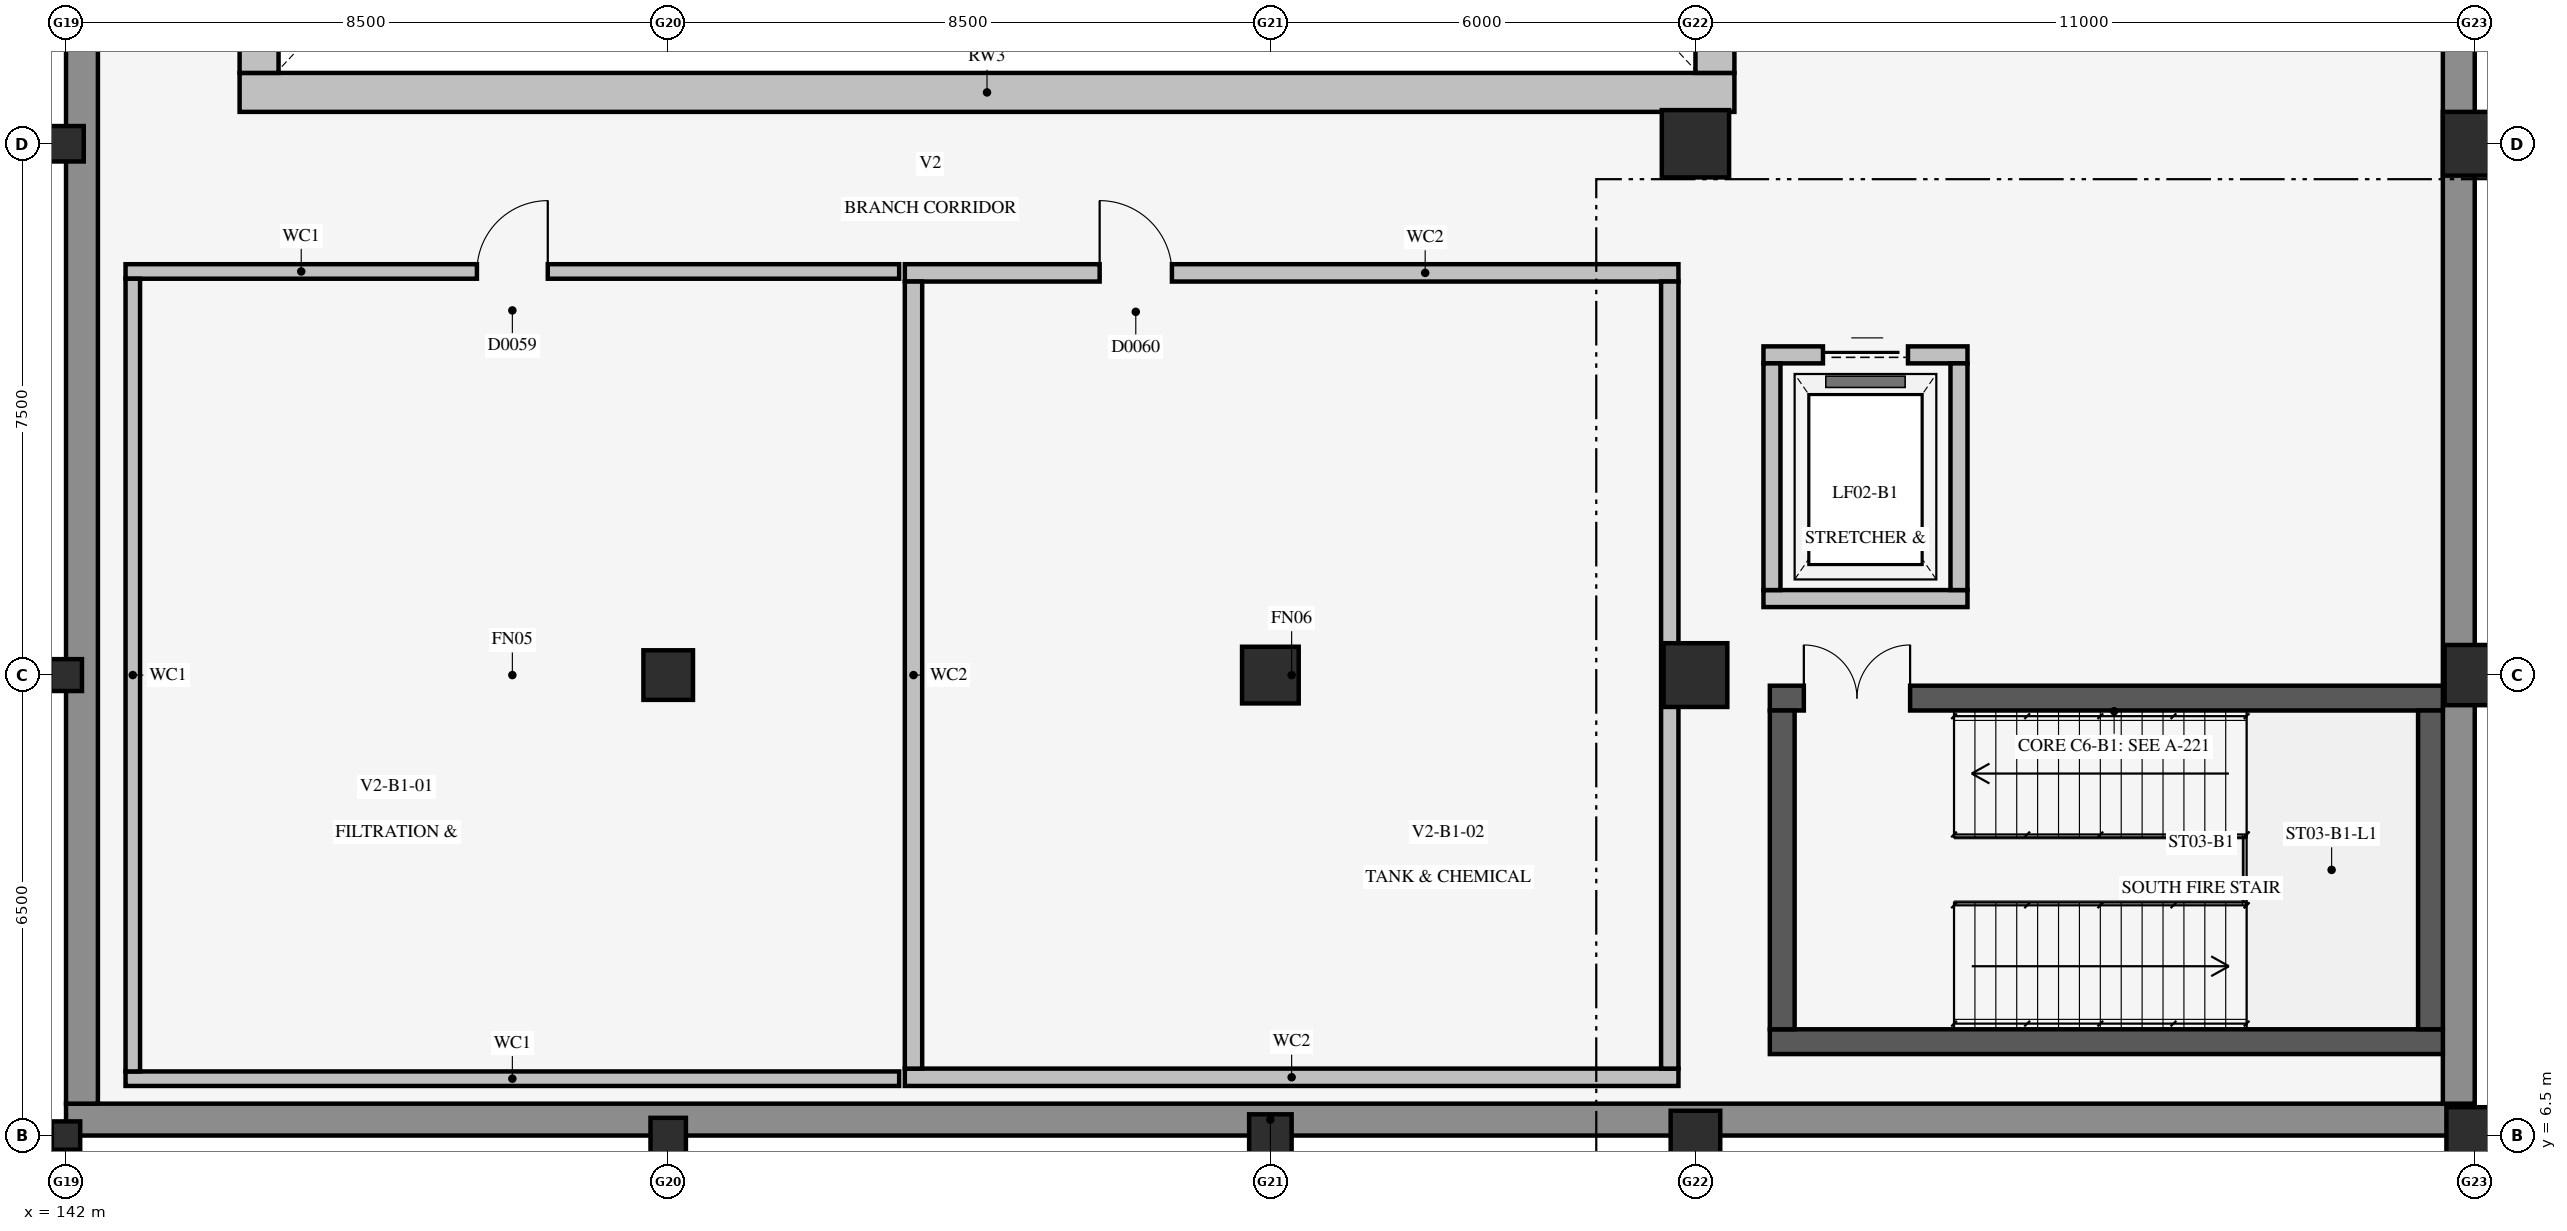
"""IFC4 building model, lengths in metres.
Left out: names, types, materials, properties, quantities, classifications, styles, units other than length and angle.
Written with IfcOpenShell. Run it as: python <this file> out.ifc"""

import sys

from ifc_helpers import new_model, si_unit, direction, frame, frame_2d, origin, origin_2d, place, context, subcontext, project, spatial, rectangle, extrude, element, fill, save


model = new_model("IFC4")
c1 = context("Model", 3, precision=1e-05, world=origin(), true_north=direction((0.0, 1.0)))
c2 = subcontext(c1, "Body", "Model", "MODEL_VIEW")
j1 = project(units=[si_unit("LENGTHUNIT", "METRE"), si_unit("PLANEANGLEUNIT", "RADIAN")], contexts=[c1])
p1 = place(None, origin())
s1 = spatial("IfcSite", under=j1, at=p1, CompositionType="ELEMENT")
p2 = place(p1, origin())
s2 = spatial("IfcBuilding", under=s1, at=p2, CompositionType="ELEMENT")
p3 = place(p2, frame((0.0, 0.0, -5.2)))
s3 = spatial("IfcBuildingStorey", under=s2, at=p3, CompositionType="ELEMENT", Elevation=-5.2)
p4 = place(p3, frame((144.45, 21.225, 0.2), z_axis=(0.0, 0.0, 1.0), x_axis=(1.0, 0.0, 0.0)))
e1 = element("IfcWall", 1, at=p4, inside=s3, PredefinedType="USERDEFINED", context=c2, shape_type="SweptSolid", body=[
    extrude(rectangle(XDim=21.1, YDim=0.55, at=frame_2d((10.55, 0.0))), origin(), (0.0, 0.0, 1.0), 4.72),
])
for number, where, z_axis, x_axis in (
    (2, (144.725, 21.5, 0.2), (0.0, 0.0, 1.0), (0.0, 1.0, 0.0)),
    (3, (165.275, 21.5, 0.2), (0.0, 0.0, 1.0), (0.0, 1.0, 0.0)),
):
    element("IfcWall", number, at=place(p3, frame(where, z_axis=z_axis, x_axis=x_axis)), inside=s3, PredefinedType="USERDEFINED", context=c2, shape_type="SweptSolid", body=[
        extrude(rectangle(XDim=21.5, YDim=0.55, at=frame_2d((10.75, 0.0))), origin(), (0.0, 0.0, 1.0), 4.72),
    ])
p5 = place(p3, frame((142.0, 6.725, 0.0), z_axis=(0.0, 0.0, 1.0), x_axis=(1.0, 0.0, 0.0)))
e4 = element("IfcWall", 4, at=p5, inside=s3, PredefinedType="USERDEFINED", context=c2, shape_type="SweptSolid", body=[
    extrude(rectangle(XDim=34.0, YDim=0.45, at=frame_2d((17.0, 0.0))), origin(), (0.0, 0.0, 1.0), 4.92),
])
for number, where, z_axis, x_axis in (
    (5, (142.225, 6.95, 0.0), (0.0, 0.0, 1.0), (0.0, 1.0, 0.0)),
    (6, (175.775, 6.95, 0.0), (0.0, 0.0, 1.0), (0.0, 1.0, 0.0)),
):
    element("IfcWall", number, at=place(p3, frame(where, z_axis=z_axis, x_axis=x_axis)), inside=s3, PredefinedType="USERDEFINED", context=c2, shape_type="SweptSolid", body=[
        extrude(rectangle(XDim=51.6, YDim=0.45, at=frame_2d((25.8, 0.0))), origin(), (0.0, 0.0, 1.0), 4.92),
    ])
p6 = place(p3, frame((166.05, 7.825, 0.0), z_axis=(0.0, 0.0, 1.0), x_axis=(1.0, 0.0, 0.0)))
e7 = element("IfcWall", 7, at=p6, inside=s3, PredefinedType="SHEAR", context=c2, shape_type="SweptSolid", body=[
    extrude(rectangle(XDim=9.5, YDim=0.35, at=frame_2d((4.75, 0.0))), origin(), (0.0, 0.0, 1.0), 4.92),
])
p7 = place(p3, frame((166.05, 12.675, 0.0), z_axis=(0.0, 0.0, 1.0), x_axis=(1.0, 0.0, 0.0)))
e8 = element("IfcWall", 8, at=p7, inside=s3, PredefinedType="SHEAR", context=c2, shape_type="SweptSolid", body=[
    extrude(rectangle(XDim=9.5, YDim=0.35, at=frame_2d((4.75, 0.0))), origin(), (0.0, 0.0, 1.0), 4.92),
])
p8 = place(p7, frame((0.48, 0.0, 0.0)))
e9 = element("IfcOpeningElement", 9, at=p8, cuts=e8, PredefinedType="OPENING", context=c2, shape_type="SweptSolid", body=[
    extrude(rectangle(XDim=1.5, YDim=2.3, at=frame_2d((0.75, 1.15))), frame((0.0, 0.187, 0.0), z_axis=(0.0, -1.0, 0.0), x_axis=(1.0, 0.0, 0.0)), (0.0, 0.0, 1.0), 0.374),
])
for number, where, z_axis, x_axis in (
    (10, (166.225, 8.0, 0.0), (0.0, 0.0, 1.0), (0.0, 1.0, 0.0)),
    (11, (175.375, 8.0, 0.0), (0.0, 0.0, 1.0), (0.0, 1.0, 0.0)),
):
    element("IfcWall", number, at=place(p3, frame(where, z_axis=z_axis, x_axis=x_axis)), inside=s3, PredefinedType="SHEAR", context=c2, shape_type="SweptSolid", body=[
        extrude(rectangle(XDim=4.5, YDim=0.35, at=frame_2d((2.25, 0.0))), origin(), (0.0, 0.0, 1.0), 4.92),
    ])
p9 = place(p3, frame((165.96, 14.08, 0.0), z_axis=(0.0, 0.0, 1.0), x_axis=(1.0, 0.0, 0.0)))
e12 = element("IfcWall", 12, at=p9, inside=s3, PredefinedType="SOLIDWALL", context=c2, shape_type="SweptSolid", body=[
    extrude(rectangle(XDim=2.88, YDim=0.24, at=frame_2d((1.44, 0.0))), origin(), (0.0, 0.0, 1.0), 5.2),
])
p10 = place(p3, frame((165.96, 17.52, 0.0), z_axis=(0.0, 0.0, 1.0), x_axis=(1.0, 0.0, 0.0)))
e13 = element("IfcWall", 13, at=p10, inside=s3, PredefinedType="SOLIDWALL", context=c2, shape_type="SweptSolid", body=[
    extrude(rectangle(XDim=2.88, YDim=0.24, at=frame_2d((1.44, 0.0))), origin(), (0.0, 0.0, 1.0), 5.2),
])
p11 = place(p10, frame((0.84, 0.0, 0.0)))
e14 = element("IfcOpeningElement", 14, at=p11, cuts=e13, PredefinedType="OPENING", context=c2, shape_type="SweptSolid", body=[
    extrude(rectangle(XDim=1.2, YDim=2.2, at=frame_2d((0.6, 1.1))), frame((0.0, 0.132, 0.0), z_axis=(0.0, -1.0, 0.0), x_axis=(1.0, 0.0, 0.0)), (0.0, 0.0, 1.0), 0.264),
])
for number, where, z_axis, x_axis in (
    (15, (166.08, 14.2, 0.0), (0.0, 0.0, 1.0), (0.0, 1.0, 0.0)),
    (16, (168.72, 14.2, 0.0), (0.0, 0.0, 1.0), (0.0, 1.0, 0.0)),
):
    element("IfcWall", number, at=place(p3, frame(where, z_axis=z_axis, x_axis=x_axis)), inside=s3, PredefinedType="SOLIDWALL", context=c2, shape_type="SweptSolid", body=[
        extrude(rectangle(XDim=3.2, YDim=0.24, at=frame_2d((1.6, 0.0))), origin(), (0.0, 0.0, 1.0), 5.2),
    ])
p12 = place(p3, frame((142.0, 6.5, 0.0), z_axis=(0.0, 0.0, 1.0), x_axis=(1.0, 0.0, 0.0)))
e17 = element("IfcColumn", 17, at=p12, inside=s3, PredefinedType="COLUMN", context=c2, shape_type="SweptSolid", body=[
    extrude(rectangle(XDim=0.4, YDim=0.4, at=origin_2d()), origin(), (0.0, 0.0, 1.0), 5.2),
])
p13 = place(p3, frame((142.0, 13.0, 0.0), z_axis=(0.0, 0.0, 1.0), x_axis=(1.0, 0.0, 0.0)))
e18 = element("IfcColumn", 18, at=p13, inside=s3, PredefinedType="COLUMN", context=c2, shape_type="SweptSolid", body=[
    extrude(rectangle(XDim=0.45, YDim=0.45, at=origin_2d()), origin(), (0.0, 0.0, 1.0), 5.2),
])
for number, where, z_axis, x_axis in (
    (19, (142.0, 20.5, 0.0), (0.0, 0.0, 1.0), (1.0, 0.0, 0.0)),
    (20, (150.5, 6.5, 0.0), (0.0, 0.0, 1.0), (1.0, 0.0, 0.0)),
):
    element("IfcColumn", number, at=place(p3, frame(where, z_axis=z_axis, x_axis=x_axis)), inside=s3, PredefinedType="COLUMN", context=c2, shape_type="SweptSolid", body=[
        extrude(rectangle(XDim=0.5, YDim=0.5, at=origin_2d()), origin(), (0.0, 0.0, 1.0), 5.2),
    ])
p14 = place(p3, frame((150.5, 13.0, 0.0), z_axis=(0.0, 0.0, 1.0), x_axis=(1.0, 0.0, 0.0)))
e21 = element("IfcColumn", 21, at=p14, inside=s3, PredefinedType="COLUMN", context=c2, shape_type="SweptSolid", body=[
    extrude(rectangle(XDim=0.7, YDim=0.7, at=origin_2d()), origin(), (0.0, 0.0, 1.0), 5.2),
])
p15 = place(p3, frame((159.0, 6.5, 0.0), z_axis=(0.0, 0.0, 1.0), x_axis=(1.0, 0.0, 0.0)))
e22 = element("IfcColumn", 22, at=p15, inside=s3, PredefinedType="COLUMN", context=c2, shape_type="SweptSolid", body=[
    extrude(rectangle(XDim=0.6, YDim=0.6, at=origin_2d()), origin(), (0.0, 0.0, 1.0), 5.2),
])
p16 = place(p3, frame((159.0, 13.0, 0.0), z_axis=(0.0, 0.0, 1.0), x_axis=(1.0, 0.0, 0.0)))
e23 = element("IfcColumn", 23, at=p16, inside=s3, PredefinedType="COLUMN", context=c2, shape_type="SweptSolid", body=[
    extrude(rectangle(XDim=0.8, YDim=0.8, at=origin_2d()), origin(), (0.0, 0.0, 1.0), 5.2),
])
p17 = place(p3, frame((165.0, 6.5, 0.0), z_axis=(0.0, 0.0, 1.0), x_axis=(1.0, 0.0, 0.0)))
e24 = element("IfcColumn", 24, at=p17, inside=s3, PredefinedType="COLUMN", context=c2, shape_type="SweptSolid", body=[
    extrude(rectangle(XDim=0.7, YDim=0.7, at=origin_2d()), origin(), (0.0, 0.0, 1.0), 5.2),
])
p18 = place(p3, frame((165.0, 13.0, 0.0), z_axis=(0.0, 0.0, 1.0), x_axis=(1.0, 0.0, 0.0)))
e25 = element("IfcColumn", 25, at=p18, inside=s3, PredefinedType="COLUMN", context=c2, shape_type="SweptSolid", body=[
    extrude(rectangle(XDim=0.9, YDim=0.9, at=origin_2d()), origin(), (0.0, 0.0, 1.0), 5.2),
])
p19 = place(p3, frame((165.0, 20.5, 0.0), z_axis=(0.0, 0.0, 1.0), x_axis=(1.0, 0.0, 0.0)))
e26 = element("IfcColumn", 26, at=p19, inside=s3, PredefinedType="COLUMN", context=c2, shape_type="SweptSolid", body=[
    extrude(rectangle(XDim=0.95, YDim=0.95, at=origin_2d()), origin(), (0.0, 0.0, 1.0), 5.2),
])
p20 = place(p3, frame((176.0, 6.5, 0.0), z_axis=(0.0, 0.0, 1.0), x_axis=(1.0, 0.0, 0.0)))
e27 = element("IfcColumn", 27, at=p20, inside=s3, PredefinedType="COLUMN", context=c2, shape_type="SweptSolid", body=[
    extrude(rectangle(XDim=0.8, YDim=0.8, at=origin_2d()), origin(), (0.0, 0.0, 1.0), 5.2),
])
p21 = place(p3, frame((176.0, 13.0, 0.0), z_axis=(0.0, 0.0, 1.0), x_axis=(1.0, 0.0, 0.0)))
e28 = element("IfcColumn", 28, at=p21, inside=s3, PredefinedType="COLUMN", context=c2, shape_type="SweptSolid", body=[
    extrude(rectangle(XDim=0.85, YDim=0.85, at=origin_2d()), origin(), (0.0, 0.0, 1.0), 5.2),
])
p22 = place(p3, frame((176.0, 20.5, 0.0), z_axis=(0.0, 0.0, 1.0), x_axis=(1.0, 0.0, 0.0)))
e29 = element("IfcColumn", 29, at=p22, inside=s3, PredefinedType="COLUMN", context=c2, shape_type="SweptSolid", body=[
    extrude(rectangle(XDim=0.9, YDim=0.9, at=origin_2d()), origin(), (0.0, 0.0, 1.0), 5.2),
])
p23 = place(p3, frame((142.84, 7.302, 0.0), z_axis=(0.0, 0.0, 1.0), x_axis=(1.0, 0.0, 0.0)))
e30 = element("IfcWall", 30, at=p23, inside=s3, PredefinedType="SOLIDWALL", context=c2, shape_type="SweptSolid", body=[
    extrude(rectangle(XDim=10.92, YDim=0.205, at=frame_2d((5.46, 0.0))), origin(), (0.0, 0.0, 1.0), 4.905),
])
p24 = place(p3, frame((142.84, 18.698, 0.0), z_axis=(0.0, 0.0, 1.0), x_axis=(1.0, 0.0, 0.0)))
e31 = element("IfcWall", 31, at=p24, inside=s3, PredefinedType="SOLIDWALL", context=c2, shape_type="SweptSolid", body=[
    extrude(rectangle(XDim=10.92, YDim=0.205, at=frame_2d((5.46, 0.0))), origin(), (0.0, 0.0, 1.0), 4.905),
])
p25 = place(p24, frame((4.96, 0.0, 0.0)))
e32 = element("IfcOpeningElement", 32, at=p25, cuts=e31, PredefinedType="OPENING", context=c2, shape_type="SweptSolid", body=[
    extrude(rectangle(XDim=1.0, YDim=2.2, at=frame_2d((0.5, 1.1))), frame((0.0, 0.115, 0.0), z_axis=(0.0, -1.0, 0.0), x_axis=(1.0, 0.0, 0.0)), (0.0, 0.0, 1.0), 0.229),
])
p26 = place(p3, frame((142.942, 7.405, 0.0), z_axis=(0.0, 0.0, 1.0), x_axis=(0.0, 1.0, 0.0)))
e33 = element("IfcWall", 33, at=p26, inside=s3, PredefinedType="SOLIDWALL", context=c2, shape_type="SweptSolid", body=[
    extrude(rectangle(XDim=11.19, YDim=0.205, at=frame_2d((5.595, 0.0))), origin(), (0.0, 0.0, 1.0), 4.905),
])
p27 = place(p3, frame((153.84, 7.323, 0.0), z_axis=(0.0, 0.0, 1.0), x_axis=(1.0, 0.0, 0.0)))
e34 = element("IfcWall", 34, at=p27, inside=s3, PredefinedType="SOLIDWALL", context=c2, shape_type="SweptSolid", body=[
    extrude(rectangle(XDim=10.92, YDim=0.245, at=frame_2d((5.46, 0.0))), origin(), (0.0, 0.0, 1.0), 4.905),
])
p28 = place(p3, frame((153.84, 18.677, 0.0), z_axis=(0.0, 0.0, 1.0), x_axis=(1.0, 0.0, 0.0)))
e35 = element("IfcWall", 35, at=p28, inside=s3, PredefinedType="SOLIDWALL", context=c2, shape_type="SweptSolid", body=[
    extrude(rectangle(XDim=10.92, YDim=0.245, at=frame_2d((5.46, 0.0))), origin(), (0.0, 0.0, 1.0), 4.905),
])
p29 = place(p28, frame((2.75, 0.0, 0.0)))
e36 = element("IfcOpeningElement", 36, at=p29, cuts=e35, PredefinedType="OPENING", context=c2, shape_type="SweptSolid", body=[
    extrude(rectangle(XDim=1.02, YDim=2.2, at=frame_2d((0.51, 1.1))), frame((0.0, 0.135, 0.0), z_axis=(0.0, -1.0, 0.0), x_axis=(1.0, 0.0, 0.0)), (0.0, 0.0, 1.0), 0.269),
])
p30 = place(p3, frame((164.637, 7.445, 0.0), z_axis=(0.0, 0.0, 1.0), x_axis=(0.0, 1.0, 0.0)))
e37 = element("IfcWall", 37, at=p30, inside=s3, PredefinedType="SOLIDWALL", context=c2, shape_type="SweptSolid", body=[
    extrude(rectangle(XDim=11.11, YDim=0.245, at=frame_2d((5.555, 0.0))), origin(), (0.0, 0.0, 1.0), 3.64),
])
p31 = place(p3, frame((153.962, 7.445, 0.0), z_axis=(0.0, 0.0, 1.0), x_axis=(0.0, 1.0, 0.0)))
e38 = element("IfcWall", 38, at=p31, inside=s3, PredefinedType="SOLIDWALL", context=c2, shape_type="SweptSolid", body=[
    extrude(rectangle(XDim=11.11, YDim=0.245, at=frame_2d((5.555, 0.0))), origin(), (0.0, 0.0, 1.0), 4.905),
])
p32 = place(p8, frame((1.5, 0.0, 0.0), z_axis=(0.0, 0.0, 1.0), x_axis=(-1.0, 0.0, 0.0)))
e39 = element("IfcDoor", 39, at=p32, inside=s3, OperationType="DOUBLE_DOOR_SINGLE_SWING", PredefinedType="DOOR", context=c2, shape_type="SweptSolid", body=[
    extrude(rectangle(XDim=1.5, YDim=2.3, at=frame_2d((0.75, 1.15))), frame((0.0, 0.025, 0.0), z_axis=(0.0, -1.0, 0.0), x_axis=(1.0, 0.0, 0.0)), (0.0, 0.0, 1.0), 0.05),
])
fill(e9, e39)
p33 = place(p25, frame((1.0, 0.0, 0.0), z_axis=(0.0, 0.0, 1.0), x_axis=(-1.0, 0.0, 0.0)))
e40 = element("IfcDoor", 40, at=p33, inside=s3, OperationType="SINGLE_SWING_RIGHT", PredefinedType="DOOR", context=c2, shape_type="SweptSolid", body=[
    extrude(rectangle(XDim=1.0, YDim=2.2, at=frame_2d((0.5, 1.1))), frame((0.0, 0.025, 0.0), z_axis=(0.0, -1.0, 0.0), x_axis=(1.0, 0.0, 0.0)), (0.0, 0.0, 1.0), 0.05),
])
fill(e32, e40)
p34 = place(p29, frame((1.02, 0.0, 0.0), z_axis=(0.0, 0.0, 1.0), x_axis=(-1.0, 0.0, 0.0)))
e41 = element("IfcDoor", 41, at=p34, inside=s3, OperationType="SINGLE_SWING_LEFT", PredefinedType="DOOR", context=c2, shape_type="SweptSolid", body=[
    extrude(rectangle(XDim=1.02, YDim=2.2, at=frame_2d((0.51, 1.1))), frame((0.0, 0.025, 0.0), z_axis=(0.0, -1.0, 0.0), x_axis=(1.0, 0.0, 0.0)), (0.0, 0.0, 1.0), 0.05),
])
fill(e36, e41)
p35 = place(p11, origin())
e42 = element("IfcDoor", 42, at=p35, inside=s3, OperationType="SLIDING_TO_LEFT", PredefinedType="USERDEFINED", context=c2, shape_type="SweptSolid", body=[
    extrude(rectangle(XDim=1.2, YDim=2.2, at=frame_2d((0.6, 1.1))), frame((0.0, 0.025, 0.0), z_axis=(0.0, -1.0, 0.0), x_axis=(1.0, 0.0, 0.0)), (0.0, 0.0, 1.0), 0.05),
])
fill(e14, e42)
save(model, sys.argv[1])
